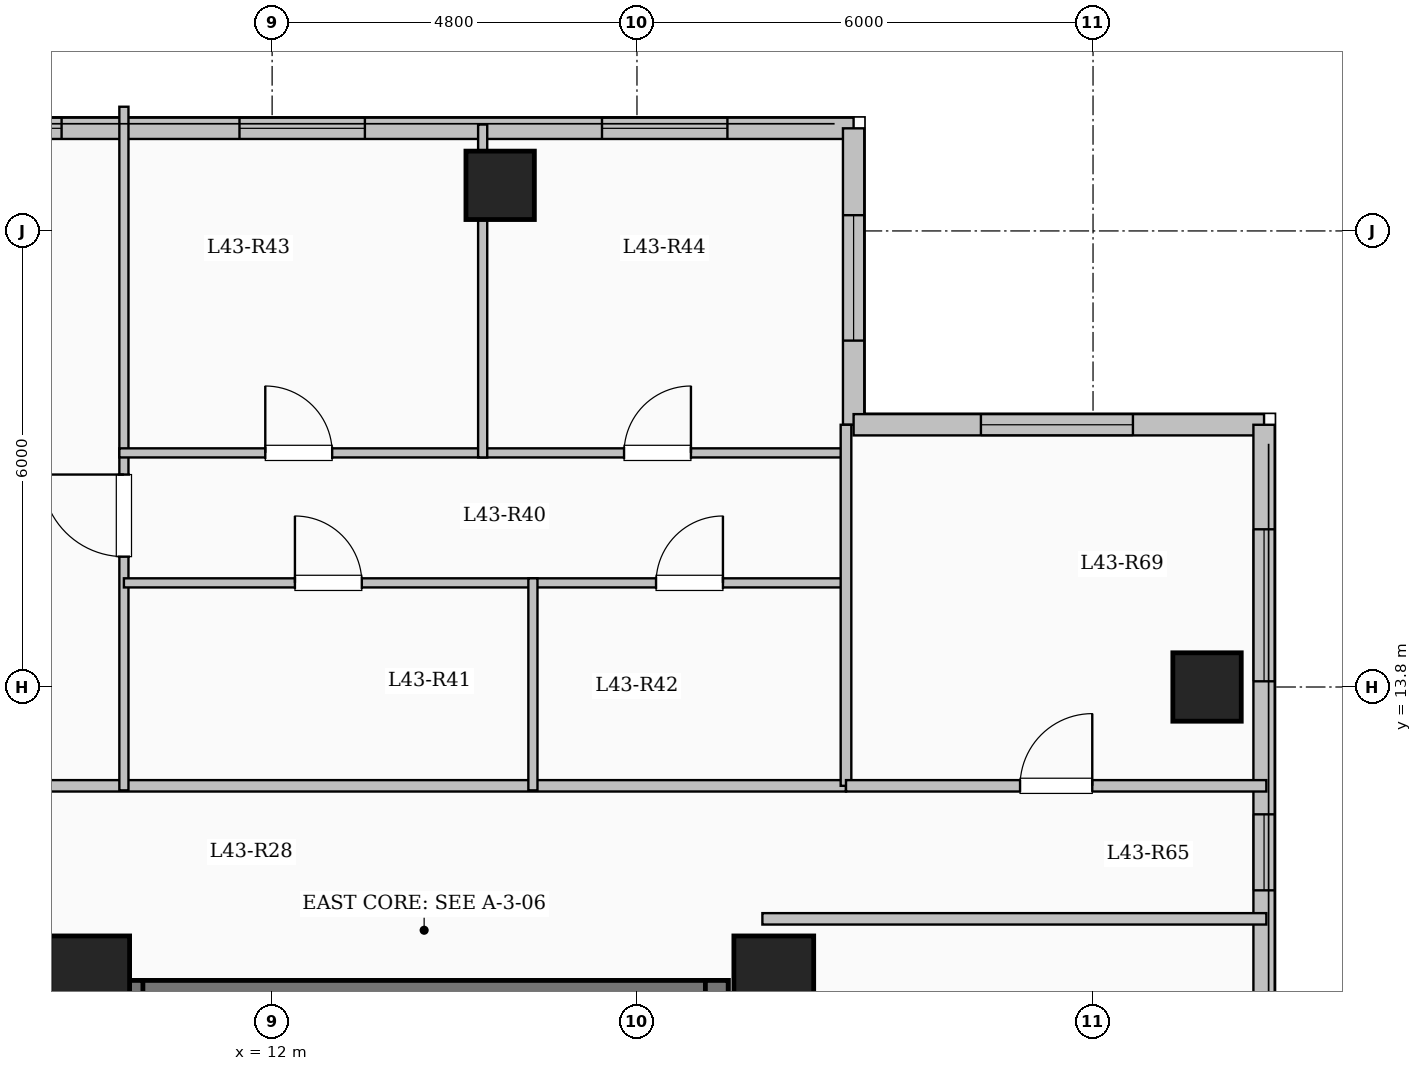
"""IFC4 building model, lengths in metres.
Left out: names, types, materials, properties, quantities, classifications, styles, units other than length and angle.
Written with IfcOpenShell. Run it as: python <this file> out.ifc"""

import sys

from ifc_helpers import new_model, si_unit, direction, frame, frame_2d, origin, origin_2d, place, context, subcontext, project, spatial, rectangle, extrude, element, fill, save


model = new_model("IFC4")
c1 = context("Model", 3, precision=1e-05, world=origin(), true_north=direction((0.0, 1.0)))
c2 = subcontext(c1, "Body", "Model", "MODEL_VIEW")
j1 = project(units=[si_unit("LENGTHUNIT", "METRE"), si_unit("PLANEANGLEUNIT", "RADIAN")], contexts=[c1])
p1 = place(None, origin())
s1 = spatial("IfcSite", under=j1, at=p1, CompositionType="ELEMENT")
p2 = place(p1, origin())
s2 = spatial("IfcBuilding", under=s1, at=p2, CompositionType="ELEMENT")
p3 = place(p2, frame((0.0, 0.0, 159.4)))
s3 = spatial("IfcBuildingStorey", under=s2, at=p3, CompositionType="ELEMENT", Elevation=159.4)
for number, where, z_axis, x_axis in (
    (1, (9.6, 10.0, 0.0), (0.0, 0.0, 1.0), (1.0, 0.0, 0.0)),
    (2, (18.6, 10.0, 0.0), (0.0, 0.0, 1.0), (1.0, 0.0, 0.0)),
):
    element("IfcColumn", number, at=place(p3, frame(where, z_axis=z_axis, x_axis=x_axis)), inside=s3, PredefinedType="COLUMN", context=c2, shape_type="SweptSolid", body=[
        extrude(rectangle(XDim=1.05, YDim=1.05, at=origin_2d()), origin(), (0.0, 0.0, 1.0), 3.35),
    ])
for number, where, z_axis, x_axis in (
    (3, (15.0, 20.4, 0.0), (0.0, 0.0, 1.0), (1.0, 0.0, 0.0)),
    (4, (24.3, 13.8, 0.0), (0.0, 0.0, 1.0), (1.0, 0.0, 0.0)),
):
    element("IfcColumn", number, at=place(p3, frame(where, z_axis=z_axis, x_axis=x_axis)), inside=s3, PredefinedType="COLUMN", context=c2, shape_type="SweptSolid", body=[
        extrude(rectangle(XDim=0.9, YDim=0.9, at=origin_2d()), origin(), (0.0, 0.0, 1.0), 3.35),
    ])
p4 = place(p3, frame((7.35, 21.15, 0.0), z_axis=(0.0, 0.0, 1.0), x_axis=(1.0, 0.0, 0.0)))
e5 = element("IfcWall", 5, at=p4, inside=s3, PredefinedType="SOLIDWALL", context=c2, shape_type="SweptSolid", body=[
    extrude(rectangle(XDim=12.3, YDim=0.28, at=frame_2d((6.15, 0.0))), origin(), (0.0, 0.0, 1.0), 3.1),
])
p5 = place(p4, frame((0.68, 0.0, 0.95)))
e6 = element("IfcOpeningElement", 6, at=p5, cuts=e5, PredefinedType="OPENING", context=c2, shape_type="SweptSolid", body=[
    extrude(rectangle(XDim=1.2, YDim=1.5, at=frame_2d((0.6, 0.75))), frame((0.0, 0.15, 0.0), z_axis=(0.0, -1.0, 0.0), x_axis=(1.0, 0.0, 0.0)), (0.0, 0.0, 1.0), 0.3),
])
p6 = place(p4, frame((4.22, 0.0, 0.9)))
e7 = element("IfcOpeningElement", 7, at=p6, cuts=e5, PredefinedType="OPENING", context=c2, shape_type="SweptSolid", body=[
    extrude(rectangle(XDim=1.65, YDim=1.6, at=frame_2d((0.825, 0.8))), frame((0.0, 0.15, 0.0), z_axis=(0.0, -1.0, 0.0), x_axis=(1.0, 0.0, 0.0)), (0.0, 0.0, 1.0), 0.3),
])
p7 = place(p4, frame((8.99, 0.0, 0.9)))
e8 = element("IfcOpeningElement", 8, at=p7, cuts=e5, PredefinedType="OPENING", context=c2, shape_type="SweptSolid", body=[
    extrude(rectangle(XDim=1.65, YDim=1.6, at=frame_2d((0.825, 0.8))), frame((0.0, 0.15, 0.0), z_axis=(0.0, -1.0, 0.0), x_axis=(1.0, 0.0, 0.0)), (0.0, 0.0, 1.0), 0.3),
])
p8 = place(p3, frame((19.65, 21.15, 0.0), z_axis=(0.0, 0.0, 1.0), x_axis=(0.0, -1.0, 0.0)))
e9 = element("IfcWall", 9, at=p8, inside=s3, PredefinedType="SOLIDWALL", context=c2, shape_type="SweptSolid", body=[
    extrude(rectangle(XDim=3.9, YDim=0.28, at=frame_2d((1.95, 0.0))), origin(), (0.0, 0.0, 1.0), 3.1),
])
p9 = place(p8, frame((1.143, 0.0, 0.9)))
e10 = element("IfcOpeningElement", 10, at=p9, cuts=e9, PredefinedType="OPENING", context=c2, shape_type="SweptSolid", body=[
    extrude(rectangle(XDim=1.65, YDim=1.6, at=frame_2d((0.825, 0.8))), frame((0.0, 0.15, 0.0), z_axis=(0.0, -1.0, 0.0), x_axis=(1.0, 0.0, 0.0)), (0.0, 0.0, 1.0), 0.3),
])
p10 = place(p3, frame((19.65, 17.25, 0.0), z_axis=(0.0, 0.0, 1.0), x_axis=(1.0, 0.0, 0.0)))
e11 = element("IfcWall", 11, at=p10, inside=s3, PredefinedType="SOLIDWALL", context=c2, shape_type="SweptSolid", body=[
    extrude(rectangle(XDim=5.4, YDim=0.28, at=frame_2d((2.7, 0.0))), origin(), (0.0, 0.0, 1.0), 3.1),
])
p11 = place(p10, frame((1.675, 0.0, 0.9)))
e12 = element("IfcOpeningElement", 12, at=p11, cuts=e11, PredefinedType="OPENING", context=c2, shape_type="SweptSolid", body=[
    extrude(rectangle(XDim=2.0, YDim=1.7, at=frame_2d((1.0, 0.85))), frame((0.0, 0.15, 0.0), z_axis=(0.0, -1.0, 0.0), x_axis=(1.0, 0.0, 0.0)), (0.0, 0.0, 1.0), 0.3),
])
p12 = place(p3, frame((25.05, 17.25, 0.0), z_axis=(0.0, 0.0, 1.0), x_axis=(0.0, -1.0, 0.0)))
e13 = element("IfcWall", 13, at=p12, inside=s3, PredefinedType="SOLIDWALL", context=c2, shape_type="SweptSolid", body=[
    extrude(rectangle(XDim=34.5, YDim=0.28, at=frame_2d((17.25, 0.0))), origin(), (0.0, 0.0, 1.0), 3.1),
])
p13 = place(p12, frame((1.375, 0.0, 0.9)))
e14 = element("IfcOpeningElement", 14, at=p13, cuts=e13, PredefinedType="OPENING", context=c2, shape_type="SweptSolid", body=[
    extrude(rectangle(XDim=2.0, YDim=1.7, at=frame_2d((1.0, 0.85))), frame((0.0, 0.15, 0.0), z_axis=(0.0, -1.0, 0.0), x_axis=(1.0, 0.0, 0.0)), (0.0, 0.0, 1.0), 0.3),
])
p14 = place(p12, frame((5.125, 0.0, 0.95)))
e15 = element("IfcOpeningElement", 15, at=p14, cuts=e13, PredefinedType="OPENING", context=c2, shape_type="SweptSolid", body=[
    extrude(rectangle(XDim=1.0, YDim=1.5, at=frame_2d((0.5, 0.75))), frame((0.0, 0.15, 0.0), z_axis=(0.0, -1.0, 0.0), x_axis=(1.0, 0.0, 0.0)), (0.0, 0.0, 1.0), 0.3),
])
p15 = place(p12, frame((14.5, 0.0, 0.9)))
e16 = element("IfcOpeningElement", 16, at=p15, cuts=e13, PredefinedType="OPENING", context=c2, shape_type="SweptSolid", body=[
    extrude(rectangle(XDim=2.0, YDim=1.7, at=frame_2d((1.0, 0.85))), frame((0.0, 0.15, 0.0), z_axis=(0.0, -1.0, 0.0), x_axis=(1.0, 0.0, 0.0)), (0.0, 0.0, 1.0), 0.3),
])
p16 = place(p12, frame((25.258, 0.0, 0.9)))
e17 = element("IfcOpeningElement", 17, at=p16, cuts=e13, PredefinedType="OPENING", context=c2, shape_type="SweptSolid", body=[
    extrude(rectangle(XDim=1.5, YDim=1.65, at=frame_2d((0.75, 0.825))), frame((0.0, 0.15, 0.0), z_axis=(0.0, -1.0, 0.0), x_axis=(1.0, 0.0, 0.0)), (0.0, 0.0, 1.0), 0.3),
])
p17 = place(p12, frame((29.95, 0.0, 0.9)))
e18 = element("IfcOpeningElement", 18, at=p17, cuts=e13, PredefinedType="OPENING", context=c2, shape_type="SweptSolid", body=[
    extrude(rectangle(XDim=2.2, YDim=1.75, at=frame_2d((1.1, 0.875))), frame((0.0, 0.15, 0.0), z_axis=(0.0, -1.0, 0.0), x_axis=(1.0, 0.0, 0.0)), (0.0, 0.0, 1.0), 0.3),
])
p18 = place(p3, frame((10.0, 9.79, 0.0), z_axis=(0.0, 0.0, 1.0), x_axis=(1.0, 0.0, 0.0)))
e19 = element("IfcWall", 19, at=p18, inside=s3, PredefinedType="SHEAR", context=c2, shape_type="SweptSolid", body=[
    extrude(rectangle(XDim=8.0, YDim=0.3, at=frame_2d((4.0, 0.0))), origin(), (0.0, 0.0, 1.0), 3.35),
])
for number, where, z_axis, x_axis in (
    (20, (10.15, 6.35, 0.0), (0.0, 0.0, 1.0), (0.0, 1.0, 0.0)),
    (21, (17.85, 6.35, 0.0), (0.0, 0.0, 1.0), (0.0, 1.0, 0.0)),
):
    element("IfcWall", number, at=place(p3, frame(where, z_axis=z_axis, x_axis=x_axis)), inside=s3, PredefinedType="SHEAR", context=c2, shape_type="SweptSolid", body=[
        extrude(rectangle(XDim=3.59, YDim=0.3, at=frame_2d((1.795, 0.0))), origin(), (0.0, 0.0, 1.0), 3.35),
    ])
p19 = place(p3, frame((3.85, 12.5, 0.0), z_axis=(0.0, 0.0, 1.0), x_axis=(1.0, 0.0, 0.0)))
e22 = element("IfcWall", 22, at=p19, inside=s3, PredefinedType="PARTITIONING", context=c2, shape_type="SweptSolid", body=[
    extrude(rectangle(XDim=15.7, YDim=0.15, at=frame_2d((7.85, 0.0))), origin(), (0.0, 0.0, 1.0), 3.1),
])
p20 = place(p19, frame((0.7, 0.0, 0.0)))
e23 = element("IfcOpeningElement", 23, at=p20, cuts=e22, PredefinedType="OPENING", context=c2, shape_type="SweptSolid", body=[
    extrude(rectangle(XDim=0.96, YDim=2.15, at=frame_2d((0.48, 1.075))), frame((0.0, 0.085, 0.0), z_axis=(0.0, -1.0, 0.0), x_axis=(1.0, 0.0, 0.0)), (0.0, 0.0, 1.0), 0.17),
])
p21 = place(p3, frame((10.05, 12.44, 0.0), z_axis=(0.0, 0.0, 1.0), x_axis=(0.0, 1.0, 0.0)))
e24 = element("IfcWall", 24, at=p21, inside=s3, PredefinedType="PARTITIONING", context=c2, shape_type="SweptSolid", body=[
    extrude(rectangle(XDim=8.994, YDim=0.12, at=frame_2d((4.497, 0.0))), origin(), (0.0, 0.0, 1.0), 3.1),
])
p22 = place(p21, frame((3.075, 0.0, 0.0)))
e25 = element("IfcOpeningElement", 25, at=p22, cuts=e24, PredefinedType="OPENING", context=c2, shape_type="SweptSolid", body=[
    extrude(rectangle(XDim=1.08, YDim=2.15, at=frame_2d((0.54, 1.075))), frame((0.0, 0.07, 0.0), z_axis=(0.0, -1.0, 0.0), x_axis=(1.0, 0.0, 0.0)), (0.0, 0.0, 1.0), 0.14),
])
p23 = place(p3, frame((10.05, 15.17, 0.0), z_axis=(0.0, 0.0, 1.0), x_axis=(1.0, 0.0, 0.0)))
e26 = element("IfcWall", 26, at=p23, inside=s3, PredefinedType="PARTITIONING", context=c2, shape_type="SweptSolid", body=[
    extrude(rectangle(XDim=5.381, YDim=0.12, at=frame_2d((2.69, 0.0))), origin(), (0.0, 0.0, 1.0), 3.1),
])
p24 = place(p23, frame((2.25, 0.0, 0.0)))
e27 = element("IfcOpeningElement", 27, at=p24, cuts=e26, PredefinedType="OPENING", context=c2, shape_type="SweptSolid", body=[
    extrude(rectangle(XDim=0.88, YDim=2.1, at=frame_2d((0.44, 1.05))), frame((0.0, 0.07, 0.0), z_axis=(0.0, -1.0, 0.0), x_axis=(1.0, 0.0, 0.0)), (0.0, 0.0, 1.0), 0.14),
])
p25 = place(p3, frame((15.431, 15.17, 0.0), z_axis=(0.0, 0.0, 1.0), x_axis=(1.0, 0.0, 0.0)))
e28 = element("IfcWall", 28, at=p25, inside=s3, PredefinedType="PARTITIONING", context=c2, shape_type="SweptSolid", body=[
    extrude(rectangle(XDim=4.119, YDim=0.12, at=frame_2d((2.06, 0.0))), origin(), (0.0, 0.0, 1.0), 3.1),
])
p26 = place(p25, frame((1.62, 0.0, 0.0)))
e29 = element("IfcOpeningElement", 29, at=p26, cuts=e28, PredefinedType="OPENING", context=c2, shape_type="SweptSolid", body=[
    extrude(rectangle(XDim=0.88, YDim=2.1, at=frame_2d((0.44, 1.05))), frame((0.0, 0.07, 0.0), z_axis=(0.0, -1.0, 0.0), x_axis=(1.0, 0.0, 0.0)), (0.0, 0.0, 1.0), 0.14),
])
p27 = place(p3, frame((9.99, 16.88, 0.0), z_axis=(0.0, 0.0, 1.0), x_axis=(1.0, 0.0, 0.0)))
e30 = element("IfcWall", 30, at=p27, inside=s3, PredefinedType="PARTITIONING", context=c2, shape_type="SweptSolid", body=[
    extrude(rectangle(XDim=9.62, YDim=0.12, at=frame_2d((4.81, 0.0))), origin(), (0.0, 0.0, 1.0), 2.685),
])
p28 = place(p27, frame((1.92, 0.0, 0.0)))
e31 = element("IfcOpeningElement", 31, at=p28, cuts=e30, PredefinedType="OPENING", context=c2, shape_type="SweptSolid", body=[
    extrude(rectangle(XDim=0.88, YDim=2.1, at=frame_2d((0.44, 1.05))), frame((0.0, 0.07, 0.0), z_axis=(0.0, -1.0, 0.0), x_axis=(1.0, 0.0, 0.0)), (0.0, 0.0, 1.0), 0.14),
])
p29 = place(p27, frame((6.64, 0.0, 0.0)))
e32 = element("IfcOpeningElement", 32, at=p29, cuts=e30, PredefinedType="OPENING", context=c2, shape_type="SweptSolid", body=[
    extrude(rectangle(XDim=0.88, YDim=2.1, at=frame_2d((0.44, 1.05))), frame((0.0, 0.07, 0.0), z_axis=(0.0, -1.0, 0.0), x_axis=(1.0, 0.0, 0.0)), (0.0, 0.0, 1.0), 0.14),
])
p30 = place(p3, frame((15.431, 12.44, 0.0), z_axis=(0.0, 0.0, 1.0), x_axis=(0.0, 1.0, 0.0)))
e33 = element("IfcWall", 33, at=p30, inside=s3, PredefinedType="PARTITIONING", context=c2, shape_type="SweptSolid", body=[
    extrude(rectangle(XDim=2.79, YDim=0.12, at=frame_2d((1.395, 0.0))), origin(), (0.0, 0.0, 1.0), 3.1),
])
p31 = place(p3, frame((14.77, 16.82, 0.0), z_axis=(0.0, 0.0, 1.0), x_axis=(0.0, 1.0, 0.0)))
e34 = element("IfcWall", 34, at=p31, inside=s3, PredefinedType="PARTITIONING", context=c2, shape_type="SweptSolid", body=[
    extrude(rectangle(XDim=4.38, YDim=0.12, at=frame_2d((2.19, 0.0))), origin(), (0.0, 0.0, 1.0), 2.585),
])
p32 = place(p3, frame((18.45, 10.75, 0.0), z_axis=(0.0, 0.0, 1.0), x_axis=(1.0, 0.0, 0.0)))
e35 = element("IfcWall", 35, at=p32, inside=s3, PredefinedType="PARTITIONING", context=c2, shape_type="SweptSolid", body=[
    extrude(rectangle(XDim=6.63, YDim=0.15, at=frame_2d((3.315, 0.0))), origin(), (0.0, 0.0, 1.0), 3.1),
])
p33 = place(p3, frame((19.55, 12.5, 0.0), z_axis=(0.0, 0.0, 1.0), x_axis=(0.0, 1.0, 0.0)))
e36 = element("IfcWall", 36, at=p33, inside=s3, PredefinedType="PARTITIONING", context=c2, shape_type="SweptSolid", body=[
    extrude(rectangle(XDim=4.75, YDim=0.14, at=frame_2d((2.375, 0.0))), origin(), (0.0, 0.0, 1.0), 3.1),
])
p34 = place(p3, frame((19.55, 12.5, 0.0), z_axis=(0.0, 0.0, 1.0), x_axis=(1.0, 0.0, 0.0)))
e37 = element("IfcWall", 37, at=p34, inside=s3, PredefinedType="PARTITIONING", context=c2, shape_type="SweptSolid", body=[
    extrude(rectangle(XDim=5.53, YDim=0.15, at=frame_2d((2.765, 0.0))), origin(), (0.0, 0.0, 1.0), 3.1),
])
p35 = place(p34, frame((2.29, 0.0, 0.0)))
e38 = element("IfcOpeningElement", 38, at=p35, cuts=e37, PredefinedType="OPENING", context=c2, shape_type="SweptSolid", body=[
    extrude(rectangle(XDim=0.95, YDim=2.15, at=frame_2d((0.475, 1.075))), frame((0.0, 0.085, 0.0), z_axis=(0.0, -1.0, 0.0), x_axis=(1.0, 0.0, 0.0)), (0.0, 0.0, 1.0), 0.17),
])
p36 = place(p5, origin())
e39 = element("IfcWindow", 39, at=p36, inside=s3, PartitioningType="SINGLE_PANEL", PredefinedType="WINDOW", context=c2, shape_type="SweptSolid", body=[
    extrude(rectangle(XDim=1.2, YDim=1.5, at=frame_2d((0.6, 0.75))), frame((0.0, 0.03, 0.0), z_axis=(0.0, -1.0, 0.0), x_axis=(1.0, 0.0, 0.0)), (0.0, 0.0, 1.0), 0.06),
])
fill(e6, e39)
p37 = place(p6, origin())
e40 = element("IfcWindow", 40, at=p37, inside=s3, PartitioningType="SINGLE_PANEL", PredefinedType="WINDOW", context=c2, shape_type="SweptSolid", body=[
    extrude(rectangle(XDim=1.65, YDim=1.6, at=frame_2d((0.825, 0.8))), frame((0.0, 0.03, 0.0), z_axis=(0.0, -1.0, 0.0), x_axis=(1.0, 0.0, 0.0)), (0.0, 0.0, 1.0), 0.06),
])
fill(e7, e40)
p38 = place(p7, origin())
e41 = element("IfcWindow", 41, at=p38, inside=s3, PartitioningType="SINGLE_PANEL", PredefinedType="WINDOW", context=c2, shape_type="SweptSolid", body=[
    extrude(rectangle(XDim=1.65, YDim=1.6, at=frame_2d((0.825, 0.8))), frame((0.0, 0.03, 0.0), z_axis=(0.0, -1.0, 0.0), x_axis=(1.0, 0.0, 0.0)), (0.0, 0.0, 1.0), 0.06),
])
fill(e8, e41)
p39 = place(p9, origin())
e42 = element("IfcWindow", 42, at=p39, inside=s3, PartitioningType="SINGLE_PANEL", PredefinedType="WINDOW", context=c2, shape_type="SweptSolid", body=[
    extrude(rectangle(XDim=1.65, YDim=1.6, at=frame_2d((0.825, 0.8))), frame((0.0, 0.03, 0.0), z_axis=(0.0, -1.0, 0.0), x_axis=(1.0, 0.0, 0.0)), (0.0, 0.0, 1.0), 0.06),
])
fill(e10, e42)
p40 = place(p11, origin())
e43 = element("IfcWindow", 43, at=p40, inside=s3, PartitioningType="SINGLE_PANEL", PredefinedType="WINDOW", context=c2, shape_type="SweptSolid", body=[
    extrude(rectangle(XDim=2.0, YDim=1.7, at=frame_2d((1.0, 0.85))), frame((0.0, 0.03, 0.0), z_axis=(0.0, -1.0, 0.0), x_axis=(1.0, 0.0, 0.0)), (0.0, 0.0, 1.0), 0.06),
])
fill(e12, e43)
p41 = place(p13, origin())
e44 = element("IfcWindow", 44, at=p41, inside=s3, PartitioningType="SINGLE_PANEL", PredefinedType="WINDOW", context=c2, shape_type="SweptSolid", body=[
    extrude(rectangle(XDim=2.0, YDim=1.7, at=frame_2d((1.0, 0.85))), frame((0.0, 0.03, 0.0), z_axis=(0.0, -1.0, 0.0), x_axis=(1.0, 0.0, 0.0)), (0.0, 0.0, 1.0), 0.06),
])
fill(e14, e44)
p42 = place(p14, origin())
e45 = element("IfcWindow", 45, at=p42, inside=s3, PartitioningType="SINGLE_PANEL", PredefinedType="WINDOW", context=c2, shape_type="SweptSolid", body=[
    extrude(rectangle(XDim=1.0, YDim=1.5, at=frame_2d((0.5, 0.75))), frame((0.0, 0.03, 0.0), z_axis=(0.0, -1.0, 0.0), x_axis=(1.0, 0.0, 0.0)), (0.0, 0.0, 1.0), 0.06),
])
fill(e15, e45)
p43 = place(p22, origin())
e46 = element("IfcDoor", 46, at=p43, inside=s3, OperationType="SINGLE_SWING_RIGHT", PredefinedType="DOOR", context=c2, shape_type="SweptSolid", body=[
    extrude(rectangle(XDim=1.08, YDim=2.15, at=frame_2d((0.54, 1.075))), frame((0.0, 0.025, 0.0), z_axis=(0.0, -1.0, 0.0), x_axis=(1.0, 0.0, 0.0)), (0.0, 0.0, 1.0), 0.05),
])
fill(e25, e46)
p44 = place(p24, origin())
e47 = element("IfcDoor", 47, at=p44, inside=s3, OperationType="SINGLE_SWING_LEFT", PredefinedType="DOOR", context=c2, shape_type="SweptSolid", body=[
    extrude(rectangle(XDim=0.88, YDim=2.1, at=frame_2d((0.44, 1.05))), frame((0.0, 0.025, 0.0), z_axis=(0.0, -1.0, 0.0), x_axis=(1.0, 0.0, 0.0)), (0.0, 0.0, 1.0), 0.05),
])
fill(e27, e47)
p45 = place(p26, origin())
e48 = element("IfcDoor", 48, at=p45, inside=s3, OperationType="SINGLE_SWING_RIGHT", PredefinedType="DOOR", context=c2, shape_type="SweptSolid", body=[
    extrude(rectangle(XDim=0.88, YDim=2.1, at=frame_2d((0.44, 1.05))), frame((0.0, 0.025, 0.0), z_axis=(0.0, -1.0, 0.0), x_axis=(1.0, 0.0, 0.0)), (0.0, 0.0, 1.0), 0.05),
])
fill(e29, e48)
p46 = place(p28, origin())
e49 = element("IfcDoor", 49, at=p46, inside=s3, OperationType="SINGLE_SWING_LEFT", PredefinedType="DOOR", context=c2, shape_type="SweptSolid", body=[
    extrude(rectangle(XDim=0.88, YDim=2.1, at=frame_2d((0.44, 1.05))), frame((0.0, 0.025, 0.0), z_axis=(0.0, -1.0, 0.0), x_axis=(1.0, 0.0, 0.0)), (0.0, 0.0, 1.0), 0.05),
])
fill(e31, e49)
p47 = place(p29, origin())
e50 = element("IfcDoor", 50, at=p47, inside=s3, OperationType="SINGLE_SWING_RIGHT", PredefinedType="DOOR", context=c2, shape_type="SweptSolid", body=[
    extrude(rectangle(XDim=0.88, YDim=2.1, at=frame_2d((0.44, 1.05))), frame((0.0, 0.025, 0.0), z_axis=(0.0, -1.0, 0.0), x_axis=(1.0, 0.0, 0.0)), (0.0, 0.0, 1.0), 0.05),
])
fill(e32, e50)
p48 = place(p35, origin())
e51 = element("IfcDoor", 51, at=p48, inside=s3, OperationType="SINGLE_SWING_RIGHT", PredefinedType="DOOR", context=c2, shape_type="SweptSolid", body=[
    extrude(rectangle(XDim=0.95, YDim=2.15, at=frame_2d((0.475, 1.075))), frame((0.0, 0.025, 0.0), z_axis=(0.0, -1.0, 0.0), x_axis=(1.0, 0.0, 0.0)), (0.0, 0.0, 1.0), 0.05),
])
fill(e38, e51)
save(model, sys.argv[1])
